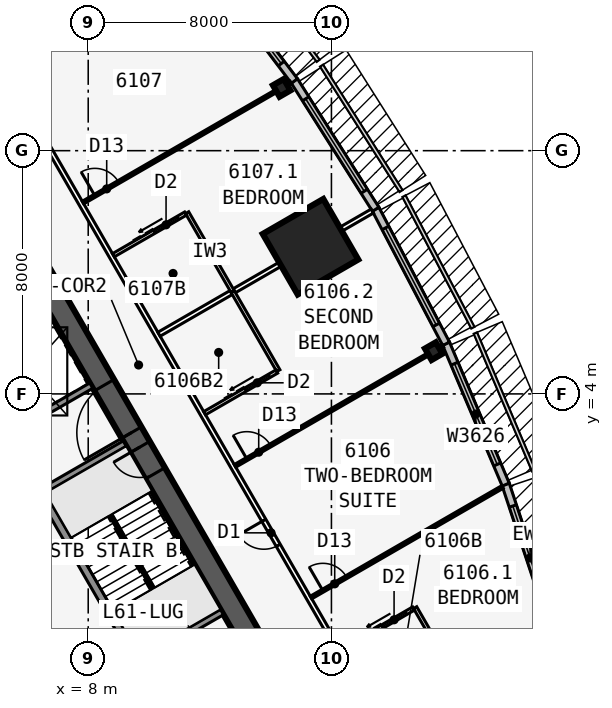
"""IFC4 building model, lengths in metres.
Left out: names, types, materials, properties, quantities, classifications, styles, units other than length and angle.
Written with IfcOpenShell. Run it as: python <this file> out.ifc"""

import sys

from ifc_helpers import new_model, si_unit, direction, frame, frame_2d, origin, origin_2d, place, context, subcontext, project, spatial, rectangle, i_section, extrude, element, fill, save


model = new_model("IFC4")
c1 = context("Model", 3, precision=1e-05, world=origin(), true_north=direction((0.0, 1.0)))
c2 = subcontext(c1, "Body", "Model", "MODEL_VIEW")
j1 = project(units=[si_unit("LENGTHUNIT", "METRE"), si_unit("PLANEANGLEUNIT", "RADIAN")], contexts=[c1])
p1 = place(None, origin())
s1 = spatial("IfcSite", under=j1, at=p1, CompositionType="ELEMENT")
p2 = place(p1, origin())
s2 = spatial("IfcBuilding", under=s1, at=p2, CompositionType="ELEMENT")
p3 = place(p2, frame((0.0, 0.0, 229.7)))
s3 = spatial("IfcBuildingStorey", under=s2, at=p3, CompositionType="ELEMENT", Elevation=229.7)
p4 = place(p3, frame((16.5, -9.526, 0.0), z_axis=(0.0, 0.0, 1.0), x_axis=(-0.499999749417, 0.866025548458, 0.0)))
e1 = element("IfcWall", 1, at=p4, inside=s3, PredefinedType="SHEAR", context=c2, shape_type="SweptSolid", body=[
    extrude(rectangle(XDim=33.0, YDim=0.75, at=frame_2d((16.5, 0.0))), origin(), (0.0, 0.0, 1.0), 3.6),
])
p5 = place(p4, frame((14.15, 0.0, 0.0)))
e2 = element("IfcOpeningElement", 2, at=p5, cuts=e1, PredefinedType="OPENING", context=c2, shape_type="SweptSolid", body=[
    extrude(rectangle(XDim=1.8, YDim=2.13, at=frame_2d((0.9, 1.065))), frame((0.0, 0.385, 0.0), z_axis=(0.0, -1.0, 0.0), x_axis=(1.0, 0.0, 0.0)), (0.0, 0.0, 1.0), 0.77),
])
p6 = place(p4, frame((12.6, 0.0, 0.0)))
e3 = element("IfcOpeningElement", 3, at=p6, cuts=e1, PredefinedType="OPENING", context=c2, shape_type="SweptSolid", body=[
    extrude(rectangle(XDim=1.0, YDim=2.13, at=frame_2d((0.5, 1.065))), frame((0.0, 0.385, 0.0), z_axis=(0.0, -1.0, 0.0), x_axis=(1.0, 0.0, 0.0)), (0.0, 0.0, 1.0), 0.77),
])
p7 = place(p3, frame((10.245, -5.843, 0.0), z_axis=(0.0, 0.0, 1.0), x_axis=(-0.499993009313, 0.866029439822, 0.0)))
e4 = element("IfcWall", 4, at=p7, inside=s3, PredefinedType="SOLIDWALL", context=c2, shape_type="SweptSolid", body=[
    extrude(rectangle(XDim=7.733, YDim=0.25, at=frame_2d((3.866, 0.0))), origin(), (0.0, 0.0, 1.0), 3.35),
])
for number, where, z_axis, x_axis in (
    (5, (9.629, -4.775, 0.0), (0.0, 0.0, 1.0), (0.866, 0.5, 0.0)),
    (6, (6.429, 0.767, 0.0), (0.0, 0.0, 1.0), (0.866, 0.5, 0.0)),
):
    element("IfcWall", number, at=place(p3, frame(where, z_axis=z_axis, x_axis=x_axis)), inside=s3, PredefinedType="SOLIDWALL", context=c2, shape_type="SweptSolid", body=[
        extrude(rectangle(XDim=3.2, YDim=0.2, at=frame_2d((1.6, 0.0))), origin(), (0.0, 0.0, 1.0), 3.35),
    ])
p8 = place(p3, frame((5.329, 2.673, 0.0), z_axis=(0.0, 0.0, 1.0), x_axis=(0.866022944154, 0.50000426018, 0.0)))
e7 = element("IfcWall", 7, at=p8, inside=s3, PredefinedType="SOLIDWALL", context=c2, shape_type="SweptSolid", body=[
    extrude(rectangle(XDim=3.2, YDim=0.2, at=frame_2d((1.6, 0.0))), origin(), (0.0, 0.0, 1.0), 3.35),
])
for number, where, z_axis, x_axis in (
    (8, (19.363, 5.406, 0.0), (0.0, 0.0, 1.0), (0.866, 0.5, 0.0)),
    (9, (14.363, 14.066, 0.0), (0.0, 0.0, 1.0), (0.866, 0.5, 0.0)),
):
    element("IfcColumn", number, at=place(p3, frame(where, z_axis=z_axis, x_axis=x_axis)), inside=s3, PredefinedType="COLUMN", context=c2, shape_type="SweptSolid", body=[
        extrude(i_section(OverallWidth=0.411, OverallDepth=0.434, WebThickness=0.036, FlangeThickness=0.057, at=origin_2d()), origin(), (0.0, 0.0, 1.0), 3.6),
    ])
p9 = place(p3, frame((15.312, 8.84, 0.0), z_axis=(0.0, 0.0, 1.0), x_axis=(0.866025403784, 0.5, 0.0)))
e10 = element("IfcColumn", 10, at=p9, inside=s3, PredefinedType="COLUMN", context=c2, shape_type="SweptSolid", body=[
    extrude(rectangle(XDim=2.3, YDim=2.3, at=origin_2d()), origin(), (0.0, 0.0, 1.0), 3.6),
])
p10 = place(p3, frame((23.338, -3.817, 0.0), z_axis=(0.0, 0.0, 1.0), x_axis=(-0.315108478109, 0.949055660656, 0.0)))
e11 = element("IfcWall", 11, at=p10, inside=s3, PredefinedType="STANDARD", context=c2, shape_type="SweptSolid", body=[
    extrude(rectangle(XDim=5.105, YDim=0.25, at=frame_2d((2.552, 0.0))), origin(), (0.0, 0.0, 1.0), 3.35),
])
p11 = place(p10, frame((0.752, 0.0, 0.45)))
e12 = element("IfcOpeningElement", 12, at=p11, cuts=e11, PredefinedType="OPENING", context=c2, shape_type="SweptSolid", body=[
    extrude(rectangle(XDim=3.6, YDim=2.6, at=frame_2d((1.8, 1.3))), frame((0.0, 0.135, 0.0), z_axis=(0.0, -1.0, 0.0), x_axis=(1.0, 0.0, 0.0)), (0.0, 0.0, 1.0), 0.27),
])
p12 = place(p3, frame((21.733, 1.018, 0.0), z_axis=(0.0, 0.0, 1.0), x_axis=(-0.390096809471, 0.920773848044, 0.0)))
e13 = element("IfcWall", 13, at=p12, inside=s3, PredefinedType="STANDARD", context=c2, shape_type="SweptSolid", body=[
    extrude(rectangle(XDim=5.038, YDim=0.25, at=frame_2d((2.519, 0.0))), origin(), (0.0, 0.0, 1.0), 3.35),
])
p13 = place(p12, frame((0.719, 0.0, 0.45)))
e14 = element("IfcOpeningElement", 14, at=p13, cuts=e13, PredefinedType="OPENING", context=c2, shape_type="SweptSolid", body=[
    extrude(rectangle(XDim=3.6, YDim=2.6, at=frame_2d((1.8, 1.3))), frame((0.0, 0.135, 0.0), z_axis=(0.0, -1.0, 0.0), x_axis=(1.0, 0.0, 0.0)), (0.0, 0.0, 1.0), 0.27),
])
p14 = place(p3, frame((19.772, 5.648, 0.0), z_axis=(0.0, 0.0, 1.0), x_axis=(-0.463976002579, 0.885847768542, 0.0)))
e15 = element("IfcWall", 15, at=p14, inside=s3, PredefinedType="STANDARD", context=c2, shape_type="SweptSolid", body=[
    extrude(rectangle(XDim=5.004, YDim=0.25, at=frame_2d((2.502, 0.0))), origin(), (0.0, 0.0, 1.0), 3.35),
])
p15 = place(p14, frame((0.702, 0.0, 0.45)))
e16 = element("IfcOpeningElement", 16, at=p15, cuts=e15, PredefinedType="OPENING", context=c2, shape_type="SweptSolid", body=[
    extrude(rectangle(XDim=3.6, YDim=2.6, at=frame_2d((1.8, 1.3))), frame((0.0, 0.135, 0.0), z_axis=(0.0, -1.0, 0.0), x_axis=(1.0, 0.0, 0.0)), (0.0, 0.0, 1.0), 0.27),
])
p16 = place(p3, frame((17.456, 10.072, 0.0), z_axis=(0.0, 0.0, 1.0), x_axis=(-0.535220361449, 0.844712474568, 0.0)))
e17 = element("IfcWall", 17, at=p16, inside=s3, PredefinedType="STANDARD", context=c2, shape_type="SweptSolid", body=[
    extrude(rectangle(XDim=5.004, YDim=0.25, at=frame_2d((2.502, 0.0))), origin(), (0.0, 0.0, 1.0), 3.35),
])
p17 = place(p16, frame((0.702, 0.0, 0.45)))
e18 = element("IfcOpeningElement", 18, at=p17, cuts=e17, PredefinedType="OPENING", context=c2, shape_type="SweptSolid", body=[
    extrude(rectangle(XDim=3.6, YDim=2.6, at=frame_2d((1.8, 1.3))), frame((0.0, 0.135, 0.0), z_axis=(0.0, -1.0, 0.0), x_axis=(1.0, 0.0, 0.0)), (0.0, 0.0, 1.0), 0.27),
])
p18 = place(p3, frame((14.783, 14.291, 0.0), z_axis=(0.0, 0.0, 1.0), x_axis=(-0.602408653511, 0.798187831388, 0.0)))
e19 = element("IfcWall", 19, at=p18, inside=s3, PredefinedType="STANDARD", context=c2, shape_type="SweptSolid", body=[
    extrude(rectangle(XDim=5.038, YDim=0.25, at=frame_2d((2.519, 0.0))), origin(), (0.0, 0.0, 1.0), 3.35),
])
p19 = place(p18, frame((0.719, 0.0, 0.45)))
e20 = element("IfcOpeningElement", 20, at=p19, cuts=e19, PredefinedType="OPENING", context=c2, shape_type="SweptSolid", body=[
    extrude(rectangle(XDim=3.6, YDim=2.6, at=frame_2d((1.8, 1.3))), frame((0.0, 0.135, 0.0), z_axis=(0.0, -1.0, 0.0), x_axis=(1.0, 0.0, 0.0)), (0.0, 0.0, 1.0), 0.27),
])
p20 = place(p3, frame((20.102, -11.115, 0.0), z_axis=(0.0, 0.0, 1.0), x_axis=(-0.500000265775, 0.866025250339, 0.0)))
e21 = element("IfcWall", 21, at=p20, inside=s3, PredefinedType="PARTITIONING", context=c2, shape_type="SweptSolid", body=[
    extrude(rectangle(XDim=39.354, YDim=0.15, at=frame_2d((19.677, 0.0))), origin(), (0.0, 0.0, 1.0), 3.35),
])
p21 = place(p20, frame((1.102, 0.0, 0.0)))
e22 = element("IfcOpeningElement", 22, at=p21, cuts=e21, PredefinedType="OPENING", context=c2, shape_type="SweptSolid", body=[
    extrude(rectangle(XDim=0.95, YDim=2.13, at=frame_2d((0.475, 1.065))), frame((0.0, 0.085, 0.0), z_axis=(0.0, -1.0, 0.0), x_axis=(1.0, 0.0, 0.0)), (0.0, 0.0, 1.0), 0.17),
])
p22 = place(p20, frame((11.702, 0.0, 0.0)))
e23 = element("IfcOpeningElement", 23, at=p22, cuts=e21, PredefinedType="OPENING", context=c2, shape_type="SweptSolid", body=[
    extrude(rectangle(XDim=0.95, YDim=2.13, at=frame_2d((0.475, 1.065))), frame((0.0, 0.085, 0.0), z_axis=(0.0, -1.0, 0.0), x_axis=(1.0, 0.0, 0.0)), (0.0, 0.0, 1.0), 0.17),
])
p23 = place(p20, frame((26.702, 0.0, 0.0)))
e24 = element("IfcOpeningElement", 24, at=p23, cuts=e21, PredefinedType="OPENING", context=c2, shape_type="SweptSolid", body=[
    extrude(rectangle(XDim=0.95, YDim=2.13, at=frame_2d((0.475, 1.065))), frame((0.0, 0.085, 0.0), z_axis=(0.0, -1.0, 0.0), x_axis=(1.0, 0.0, 0.0)), (0.0, 0.0, 1.0), 0.17),
])
p24 = place(p20, frame((37.302, 0.0, 0.0)))
e25 = element("IfcOpeningElement", 25, at=p24, cuts=e21, PredefinedType="OPENING", context=c2, shape_type="SweptSolid", body=[
    extrude(rectangle(XDim=0.95, YDim=2.13, at=frame_2d((0.475, 1.065))), frame((0.0, 0.085, 0.0), z_axis=(0.0, -1.0, 0.0), x_axis=(1.0, 0.0, 0.0)), (0.0, 0.0, 1.0), 0.17),
])
p25 = place(p3, frame((15.329, -2.697, 0.0), z_axis=(0.0, 0.0, 1.0), x_axis=(0.866032413668, 0.499987858329, 0.0)))
e26 = element("IfcWall", 26, at=p25, inside=s3, PredefinedType="PARTITIONING", context=c2, shape_type="SweptSolid", body=[
    extrude(rectangle(XDim=7.273, YDim=0.1, at=frame_2d((3.636, 0.0))), origin(), (0.0, 0.0, 1.0), 2.309),
])
p26 = place(p25, frame((0.45, 0.0, 0.0)))
e27 = element("IfcOpeningElement", 27, at=p26, cuts=e26, PredefinedType="OPENING", context=c2, shape_type="SweptSolid", body=[
    extrude(rectangle(XDim=0.9, YDim=2.13, at=frame_2d((0.45, 1.065))), frame((0.0, 0.06, 0.0), z_axis=(0.0, -1.0, 0.0), x_axis=(1.0, 0.0, 0.0)), (0.0, 0.0, 1.0), 0.12),
])
p27 = place(p3, frame((12.829, 1.633, 0.0), z_axis=(0.0, 0.0, 1.0), x_axis=(0.866030558329, 0.49999107196, 0.0)))
e28 = element("IfcWall", 28, at=p27, inside=s3, PredefinedType="PARTITIONING", context=c2, shape_type="SweptSolid", body=[
    extrude(rectangle(XDim=7.894, YDim=0.1, at=frame_2d((3.947, 0.0))), origin(), (0.0, 0.0, 1.0), 2.25),
])
p28 = place(p27, frame((0.45, 0.0, 0.0)))
e29 = element("IfcOpeningElement", 29, at=p28, cuts=e28, PredefinedType="OPENING", context=c2, shape_type="SweptSolid", body=[
    extrude(rectangle(XDim=0.9, YDim=2.13, at=frame_2d((0.45, 1.065))), frame((0.0, 0.06, 0.0), z_axis=(0.0, -1.0, 0.0), x_axis=(1.0, 0.0, 0.0)), (0.0, 0.0, 1.0), 0.12),
])
p29 = place(p3, frame((10.329, 5.963, 0.0), z_axis=(0.0, 0.0, 1.0), x_axis=(0.866016460812, 0.500015489362, 0.0)))
e30 = element("IfcWall", 30, at=p29, inside=s3, PredefinedType="PARTITIONING", context=c2, shape_type="SweptSolid", body=[
    extrude(rectangle(XDim=8.101, YDim=0.15, at=frame_2d((4.051, 0.0))), origin(), (0.0, 0.0, 1.0), 2.309),
])
p30 = place(p3, frame((7.829, 10.293, 0.0), z_axis=(0.0, 0.0, 1.0), x_axis=(0.866030558329, 0.49999107196, 0.0)))
e31 = element("IfcWall", 31, at=p30, inside=s3, PredefinedType="PARTITIONING", context=c2, shape_type="SweptSolid", body=[
    extrude(rectangle(XDim=7.894, YDim=0.1, at=frame_2d((3.947, 0.0))), origin(), (0.0, 0.0, 1.0), 2.25),
])
p31 = place(p30, frame((0.45, 0.0, 0.0)))
e32 = element("IfcOpeningElement", 32, at=p31, cuts=e31, PredefinedType="OPENING", context=c2, shape_type="SweptSolid", body=[
    extrude(rectangle(XDim=0.9, YDim=2.13, at=frame_2d((0.45, 1.065))), frame((0.0, 0.06, 0.0), z_axis=(0.0, -1.0, 0.0), x_axis=(1.0, 0.0, 0.0)), (0.0, 0.0, 1.0), 0.12),
])
p32 = place(p3, frame((5.329, 14.623, 0.0), z_axis=(0.0, 0.0, 1.0), x_axis=(0.866017877653, 0.500013035415, 0.0)))
e33 = element("IfcWall", 33, at=p32, inside=s3, PredefinedType="PARTITIONING", context=c2, shape_type="SweptSolid", body=[
    extrude(rectangle(XDim=7.273, YDim=0.1, at=frame_2d((3.636, 0.0))), origin(), (0.0, 0.0, 1.0), 2.309),
])
p33 = place(p32, frame((0.45, 0.0, 0.0)))
e34 = element("IfcOpeningElement", 34, at=p33, cuts=e33, PredefinedType="OPENING", context=c2, shape_type="SweptSolid", body=[
    extrude(rectangle(XDim=0.9, YDim=2.13, at=frame_2d((0.45, 1.065))), frame((0.0, 0.06, 0.0), z_axis=(0.0, -1.0, 0.0), x_axis=(1.0, 0.0, 0.0)), (0.0, 0.0, 1.0), 0.12),
])
p34 = place(p3, frame((20.253, -5.627, 0.0), z_axis=(0.0, 0.0, 1.0), x_axis=(-0.50002537861, 0.866010750942, 0.0)))
e35 = element("IfcWall", 35, at=p34, inside=s3, PredefinedType="PLUMBINGWALL", context=c2, shape_type="SweptSolid", body=[
    extrude(rectangle(XDim=3.0, YDim=0.12, at=frame_2d((1.5, 0.0))), origin(), (0.0, 0.0, 1.0), 3.35),
])
p35 = place(p3, frame((16.329, -4.429, 0.0), z_axis=(0.0, 0.0, 1.0), x_axis=(0.865997131366, 0.500048966069, 0.0)))
e36 = element("IfcWall", 36, at=p35, inside=s3, PredefinedType="PLUMBINGWALL", context=c2, shape_type="SweptSolid", body=[
    extrude(rectangle(XDim=2.74, YDim=0.12, at=frame_2d((1.37, 0.0))), origin(), (0.0, 0.0, 1.0), 3.35),
])
p36 = place(p35, frame((1.55, 0.0, 0.0)))
e37 = element("IfcOpeningElement", 37, at=p36, cuts=e36, PredefinedType="OPENING", context=c2, shape_type="SweptSolid", body=[
    extrude(rectangle(XDim=0.9, YDim=2.13, at=frame_2d((0.45, 1.065))), frame((0.0, 0.07, 0.0), z_axis=(0.0, -1.0, 0.0), x_axis=(1.0, 0.0, 0.0)), (0.0, 0.0, 1.0), 0.14),
])
p37 = place(p3, frame((14.253, 4.765, 0.0), z_axis=(0.0, 0.0, 1.0), x_axis=(-0.50002537861, 0.866010750942, 0.0)))
e38 = element("IfcWall", 38, at=p37, inside=s3, PredefinedType="PLUMBINGWALL", context=c2, shape_type="SweptSolid", body=[
    extrude(rectangle(XDim=3.0, YDim=0.12, at=frame_2d((1.5, 0.0))), origin(), (0.0, 0.0, 1.0), 3.35),
])
p38 = place(p3, frame((11.829, 3.365, 0.0), z_axis=(0.0, 0.0, 1.0), x_axis=(0.865997131366, 0.500048966069, 0.0)))
e39 = element("IfcWall", 39, at=p38, inside=s3, PredefinedType="PLUMBINGWALL", context=c2, shape_type="SweptSolid", body=[
    extrude(rectangle(XDim=2.74, YDim=0.12, at=frame_2d((1.37, 0.0))), origin(), (0.0, 0.0, 1.0), 3.35),
])
p39 = place(p38, frame((1.55, 0.0, 0.0)))
e40 = element("IfcOpeningElement", 40, at=p39, cuts=e39, PredefinedType="OPENING", context=c2, shape_type="SweptSolid", body=[
    extrude(rectangle(XDim=0.9, YDim=2.13, at=frame_2d((0.45, 1.065))), frame((0.0, 0.07, 0.0), z_axis=(0.0, -1.0, 0.0), x_axis=(1.0, 0.0, 0.0)), (0.0, 0.0, 1.0), 0.14),
])
p40 = place(p3, frame((12.753, 7.363, 0.0), z_axis=(0.0, 0.0, 1.0), x_axis=(-0.499990139034, 0.866031096941, 0.0)))
e41 = element("IfcWall", 41, at=p40, inside=s3, PredefinedType="PLUMBINGWALL", context=c2, shape_type="SweptSolid", body=[
    extrude(rectangle(XDim=3.0, YDim=0.12, at=frame_2d((1.5, 0.0))), origin(), (0.0, 0.0, 1.0), 3.35),
])
p41 = place(p3, frame((8.829, 8.561, 0.0), z_axis=(0.0, 0.0, 1.0), x_axis=(0.866035715982, 0.499982138324, 0.0)))
e42 = element("IfcWall", 42, at=p41, inside=s3, PredefinedType="PLUMBINGWALL", context=c2, shape_type="SweptSolid", body=[
    extrude(rectangle(XDim=2.74, YDim=0.12, at=frame_2d((1.37, 0.0))), origin(), (0.0, 0.0, 1.0), 3.35),
])
p42 = place(p41, frame((1.55, 0.0, 0.0)))
e43 = element("IfcOpeningElement", 43, at=p42, cuts=e42, PredefinedType="OPENING", context=c2, shape_type="SweptSolid", body=[
    extrude(rectangle(XDim=0.9, YDim=2.13, at=frame_2d((0.45, 1.065))), frame((0.0, 0.07, 0.0), z_axis=(0.0, -1.0, 0.0), x_axis=(1.0, 0.0, 0.0)), (0.0, 0.0, 1.0), 0.14),
])
p43 = place(p3, frame((10.135, -2.401, 0.0), z_axis=(0.0, 0.0, 1.0), x_axis=(-0.499992232847, 0.866029888106, 0.0)))
e44 = element("IfcWall", 44, at=p43, inside=s3, PredefinedType="SOLIDWALL", context=c2, shape_type="SweptSolid", body=[
    extrude(rectangle(XDim=2.794, YDim=0.1, at=frame_2d((1.397, 0.0))), origin(), (0.0, 0.0, 1.0), 3.6),
])
p44 = place(p11, origin())
e45 = element("IfcWindow", 45, at=p44, inside=s3, PartitioningType="SINGLE_PANEL", PredefinedType="WINDOW", context=c2, shape_type="SweptSolid", body=[
    extrude(rectangle(XDim=3.6, YDim=2.6, at=frame_2d((1.8, 1.3))), frame((0.0, 0.03, 0.0), z_axis=(0.0, -1.0, 0.0), x_axis=(1.0, 0.0, 0.0)), (0.0, 0.0, 1.0), 0.06),
])
fill(e12, e45)
p45 = place(p13, origin())
e46 = element("IfcWindow", 46, at=p45, inside=s3, PartitioningType="SINGLE_PANEL", PredefinedType="WINDOW", context=c2, shape_type="SweptSolid", body=[
    extrude(rectangle(XDim=3.6, YDim=2.6, at=frame_2d((1.8, 1.3))), frame((0.0, 0.03, 0.0), z_axis=(0.0, -1.0, 0.0), x_axis=(1.0, 0.0, 0.0)), (0.0, 0.0, 1.0), 0.06),
])
fill(e14, e46)
p46 = place(p15, origin())
e47 = element("IfcWindow", 47, at=p46, inside=s3, PartitioningType="SINGLE_PANEL", PredefinedType="WINDOW", context=c2, shape_type="SweptSolid", body=[
    extrude(rectangle(XDim=3.6, YDim=2.6, at=frame_2d((1.8, 1.3))), frame((0.0, 0.03, 0.0), z_axis=(0.0, -1.0, 0.0), x_axis=(1.0, 0.0, 0.0)), (0.0, 0.0, 1.0), 0.06),
])
fill(e16, e47)
p47 = place(p17, origin())
e48 = element("IfcWindow", 48, at=p47, inside=s3, PartitioningType="SINGLE_PANEL", PredefinedType="WINDOW", context=c2, shape_type="SweptSolid", body=[
    extrude(rectangle(XDim=3.6, YDim=2.6, at=frame_2d((1.8, 1.3))), frame((0.0, 0.03, 0.0), z_axis=(0.0, -1.0, 0.0), x_axis=(1.0, 0.0, 0.0)), (0.0, 0.0, 1.0), 0.06),
])
fill(e18, e48)
p48 = place(p19, origin())
e49 = element("IfcWindow", 49, at=p48, inside=s3, PartitioningType="SINGLE_PANEL", PredefinedType="WINDOW", context=c2, shape_type="SweptSolid", body=[
    extrude(rectangle(XDim=3.6, YDim=2.6, at=frame_2d((1.8, 1.3))), frame((0.0, 0.03, 0.0), z_axis=(0.0, -1.0, 0.0), x_axis=(1.0, 0.0, 0.0)), (0.0, 0.0, 1.0), 0.06),
])
fill(e20, e49)
p49 = place(p26, origin())
e50 = element("IfcDoor", 50, at=p49, inside=s3, OperationType="SINGLE_SWING_LEFT", PredefinedType="DOOR", context=c2, shape_type="SweptSolid", body=[
    extrude(rectangle(XDim=0.9, YDim=2.13, at=frame_2d((0.45, 1.065))), frame((0.0, 0.025, 0.0), z_axis=(0.0, -1.0, 0.0), x_axis=(1.0, 0.0, 0.0)), (0.0, 0.0, 1.0), 0.05),
])
fill(e27, e50)
p50 = place(p28, origin())
e51 = element("IfcDoor", 51, at=p50, inside=s3, OperationType="SINGLE_SWING_LEFT", PredefinedType="DOOR", context=c2, shape_type="SweptSolid", body=[
    extrude(rectangle(XDim=0.9, YDim=2.13, at=frame_2d((0.45, 1.065))), frame((0.0, 0.025, 0.0), z_axis=(0.0, -1.0, 0.0), x_axis=(1.0, 0.0, 0.0)), (0.0, 0.0, 1.0), 0.05),
])
fill(e29, e51)
p51 = place(p31, origin())
e52 = element("IfcDoor", 52, at=p51, inside=s3, OperationType="SINGLE_SWING_LEFT", PredefinedType="DOOR", context=c2, shape_type="SweptSolid", body=[
    extrude(rectangle(XDim=0.9, YDim=2.13, at=frame_2d((0.45, 1.065))), frame((0.0, 0.025, 0.0), z_axis=(0.0, -1.0, 0.0), x_axis=(1.0, 0.0, 0.0)), (0.0, 0.0, 1.0), 0.05),
])
fill(e32, e52)
p52 = place(p36, origin())
e53 = element("IfcDoor", 53, at=p52, inside=s3, OperationType="SLIDING_TO_LEFT", PredefinedType="DOOR", context=c2, shape_type="SweptSolid", body=[
    extrude(rectangle(XDim=0.9, YDim=2.13, at=frame_2d((0.45, 1.065))), frame((0.0, 0.025, 0.0), z_axis=(0.0, -1.0, 0.0), x_axis=(1.0, 0.0, 0.0)), (0.0, 0.0, 1.0), 0.05),
])
fill(e37, e53)
p53 = place(p22, origin())
e54 = element("IfcDoor", 54, at=p53, inside=s3, OperationType="SINGLE_SWING_RIGHT", PredefinedType="DOOR", context=c2, shape_type="SweptSolid", body=[
    extrude(rectangle(XDim=0.95, YDim=2.13, at=frame_2d((0.475, 1.065))), frame((0.0, 0.025, 0.0), z_axis=(0.0, -1.0, 0.0), x_axis=(1.0, 0.0, 0.0)), (0.0, 0.0, 1.0), 0.05),
])
fill(e23, e54)
p54 = place(p39, origin())
e55 = element("IfcDoor", 55, at=p54, inside=s3, OperationType="SLIDING_TO_LEFT", PredefinedType="DOOR", context=c2, shape_type="SweptSolid", body=[
    extrude(rectangle(XDim=0.9, YDim=2.13, at=frame_2d((0.45, 1.065))), frame((0.0, 0.025, 0.0), z_axis=(0.0, -1.0, 0.0), x_axis=(1.0, 0.0, 0.0)), (0.0, 0.0, 1.0), 0.05),
])
fill(e40, e55)
p55 = place(p42, origin())
e56 = element("IfcDoor", 56, at=p55, inside=s3, OperationType="SLIDING_TO_LEFT", PredefinedType="DOOR", context=c2, shape_type="SweptSolid", body=[
    extrude(rectangle(XDim=0.9, YDim=2.13, at=frame_2d((0.45, 1.065))), frame((0.0, 0.025, 0.0), z_axis=(0.0, -1.0, 0.0), x_axis=(1.0, 0.0, 0.0)), (0.0, 0.0, 1.0), 0.05),
])
fill(e43, e56)
p56 = place(p5, origin())
e57 = element("IfcDoor", 57, at=p56, inside=s3, OperationType="DOUBLE_DOOR_SINGLE_SWING", PredefinedType="DOOR", context=c2, shape_type="SweptSolid", body=[
    extrude(rectangle(XDim=1.8, YDim=2.13, at=frame_2d((0.9, 1.065))), frame((0.0, 0.025, 0.0), z_axis=(0.0, -1.0, 0.0), x_axis=(1.0, 0.0, 0.0)), (0.0, 0.0, 1.0), 0.05),
])
fill(e2, e57)
p57 = place(p6, origin())
e58 = element("IfcDoor", 58, at=p57, inside=s3, OperationType="SINGLE_SWING_RIGHT", PredefinedType="DOOR", context=c2, shape_type="SweptSolid", body=[
    extrude(rectangle(XDim=1.0, YDim=2.13, at=frame_2d((0.5, 1.065))), frame((0.0, 0.025, 0.0), z_axis=(0.0, -1.0, 0.0), x_axis=(1.0, 0.0, 0.0)), (0.0, 0.0, 1.0), 0.05),
])
fill(e3, e58)
save(model, sys.argv[1])
